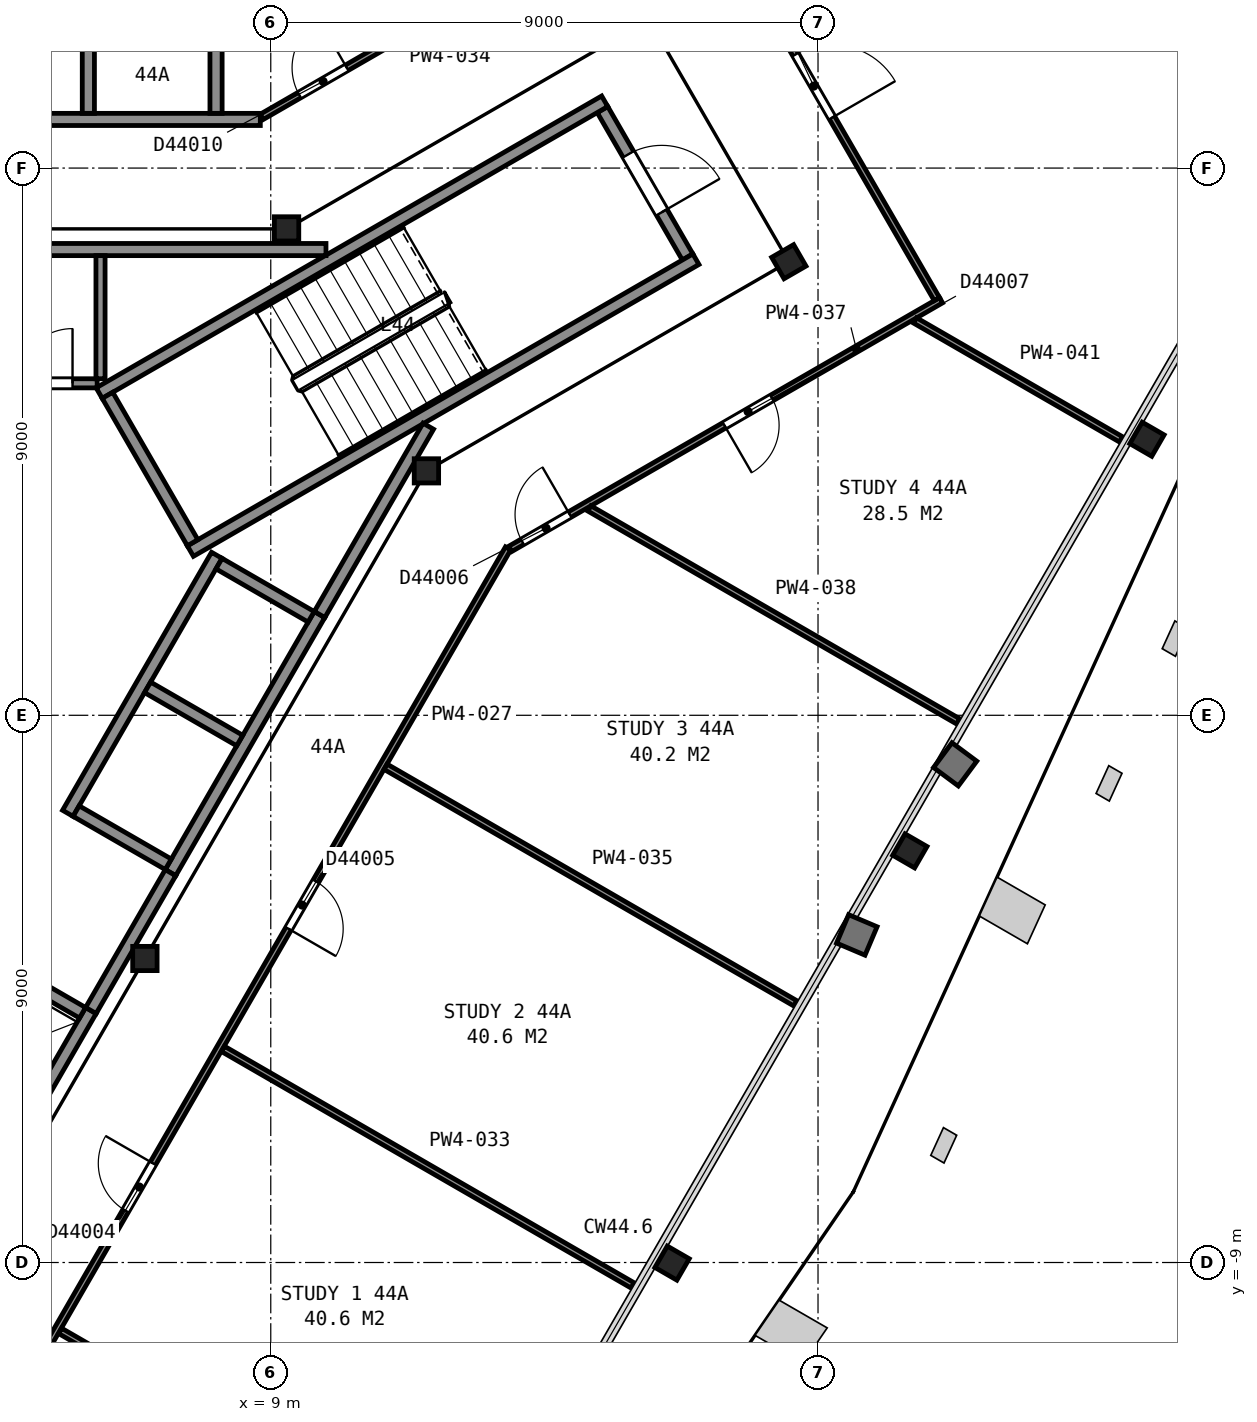
"""IFC4 building model, lengths in metres.
Left out: names, types, materials, properties, quantities, classifications, styles, units other than length and angle.
Written with IfcOpenShell. Run it as: python <this file> out.ifc"""

import sys

from ifc_helpers import new_model, si_unit, direction, frame, frame_2d, origin, origin_2d, place, context, subcontext, project, spatial, rectangle, i_section, extrude, element, fill, save


model = new_model("IFC4")
c1 = context("Model", 3, precision=1e-05, world=origin(), true_north=direction((0.0, 1.0)))
c2 = subcontext(c1, "Body", "Model", "MODEL_VIEW")
j1 = project(units=[si_unit("LENGTHUNIT", "METRE"), si_unit("PLANEANGLEUNIT", "RADIAN")], contexts=[c1])
p1 = place(None, origin())
s1 = spatial("IfcSite", under=j1, at=p1, CompositionType="ELEMENT")
p2 = place(p1, origin())
s2 = spatial("IfcBuilding", under=s1, at=p2, CompositionType="ELEMENT")
p3 = place(p2, frame((0.0, 0.0, 178.4)))
s3 = spatial("IfcBuildingStorey", under=s2, at=p3, CompositionType="ELEMENT", Elevation=178.4)
for number, where, z_axis, x_axis in (
    (1, (15.6, -9.01, 0.035), (0.0, 0.0, 1.0), (-0.5, -0.866, 0.0)),
    (2, (19.51, -2.23, 0.035), (0.0, 0.0, 1.0), (-0.5, -0.866, 0.0)),
):
    element("IfcColumn", number, at=place(p3, frame(where, z_axis=z_axis, x_axis=x_axis)), inside=s3, PredefinedType="COLUMN", context=c2, shape_type="SweptSolid", body=[
        extrude(i_section(OverallWidth=0.406, OverallDepth=0.417, WebThickness=0.03, FlangeThickness=0.048, FilletRadius=0.015, at=origin_2d()), origin(), (0.0, 0.0, 1.0), 3.665),
    ])
p4 = place(p3, frame((23.41, 4.54, 0.04), z_axis=(0.0, 0.0, 1.0), x_axis=(-0.5, -0.866025403784, 0.0)))
e3 = element("IfcColumn", 3, at=p4, inside=s3, PredefinedType="COLUMN", context=c2, shape_type="SweptSolid", body=[
    extrude(i_section(OverallWidth=0.406, OverallDepth=0.417, WebThickness=0.03, FlangeThickness=0.048, FilletRadius=0.015, at=origin_2d()), origin(), (0.0, 0.0, 1.0), 3.66),
])
p5 = place(p3, frame((11.56, 4.02, 0.0), z_axis=(0.0, 0.0, 1.0), x_axis=(1.0, 0.0, 0.0)))
e4 = element("IfcColumn", 4, at=p5, inside=s3, PredefinedType="COLUMN", context=c2, shape_type="SweptSolid", body=[
    extrude(i_section(OverallWidth=0.401, OverallDepth=0.399, WebThickness=0.025, FlangeThickness=0.04, FilletRadius=0.015, at=origin_2d()), origin(), (0.0, 0.0, 1.0), 3.7),
])
p6 = place(p3, frame((17.52, 7.46, 0.0), z_axis=(0.0, 0.0, 1.0), x_axis=(0.5, -0.866025403784, 0.0)))
e5 = element("IfcColumn", 5, at=p6, inside=s3, PredefinedType="COLUMN", context=c2, shape_type="SweptSolid", body=[
    extrude(i_section(OverallWidth=0.406, OverallDepth=0.417, WebThickness=0.03, FlangeThickness=0.048, FilletRadius=0.015, at=origin_2d()), origin(), (0.0, 0.0, 1.0), 3.7),
])
for number, where, z_axis, x_axis in (
    (6, (9.26, 8.0, 0.0), (0.0, 0.0, 1.0), (1.0, 0.0, 0.0)),
    (7, (6.93, -4.0, 0.0), (0.0, 0.0, 1.0), (1.0, 0.0, 0.0)),
):
    element("IfcColumn", number, at=place(p3, frame(where, z_axis=z_axis, x_axis=x_axis)), inside=s3, PredefinedType="COLUMN", context=c2, shape_type="SweptSolid", body=[
        extrude(i_section(OverallWidth=0.401, OverallDepth=0.399, WebThickness=0.025, FlangeThickness=0.04, FilletRadius=0.015, at=origin_2d()), origin(), (0.0, 0.0, 1.0), 3.7),
    ])
p7 = place(p3, frame((15.855, 7.538, 0.0), z_axis=(0.0, 0.0, 1.0), x_axis=(-0.500049511043, 0.865996816683, 0.0)))
e8 = element("IfcWall", 8, at=p7, inside=s3, PredefinedType="PARTITIONING", context=c2, shape_type="SweptSolid", body=[
    extrude(rectangle(XDim=2.8, YDim=0.2, at=frame_2d((1.4, 0.0))), origin(), (0.0, 0.0, 1.0), 3.45),
])
p8 = place(p7, frame((0.85, 0.0, 0.0)))
e9 = element("IfcOpeningElement", 9, at=p8, cuts=e8, PredefinedType="OPENING", context=c2, shape_type="SweptSolid", body=[
    extrude(rectangle(XDim=1.1, YDim=2.1, at=frame_2d((0.55, 1.05))), frame((0.0, 0.11, 0.0), z_axis=(0.0, -1.0, 0.0), x_axis=(1.0, 0.0, 0.0)), (0.0, 0.0, 1.0), 0.22),
])
for number, where, z_axis, x_axis in (
    (10, (6.178, 5.299, 0.0), (0.0, 0.0, 1.0), (0.866, 0.5, 0.0)),
    (11, (7.678, 2.701, 0.0), (0.0, 0.0, 1.0), (0.866, 0.5, 0.0)),
):
    element("IfcWall", number, at=place(p3, frame(where, z_axis=z_axis, x_axis=x_axis)), inside=s3, PredefinedType="PARTITIONING", context=c2, shape_type="SweptSolid", body=[
        extrude(rectangle(XDim=9.6, YDim=0.2, at=frame_2d((4.8, 0.0))), origin(), (0.0, 0.0, 1.0), 3.45),
    ])
p9 = place(p3, frame((7.715, 2.838, 0.0), z_axis=(0.0, 0.0, 1.0), x_axis=(-0.500049511043, 0.865996816683, 0.0)))
e12 = element("IfcWall", 12, at=p9, inside=s3, PredefinedType="PARTITIONING", context=c2, shape_type="SweptSolid", body=[
    extrude(rectangle(XDim=2.8, YDim=0.2, at=frame_2d((1.4, 0.0))), origin(), (0.0, 0.0, 1.0), 3.45),
])
p10 = place(p3, frame((4.766, -7.065, 0.0), z_axis=(0.0, 0.0, 1.0), x_axis=(0.499948979701, 0.866054858364, 0.0)))
e13 = element("IfcWall", 13, at=p10, inside=s3, PredefinedType="PARTITIONING", context=c2, shape_type="SweptSolid", body=[
    extrude(rectangle(XDim=2.55, YDim=0.2, at=frame_2d((1.275, 0.0))), origin(), (0.0, 0.0, 1.0), 3.7),
])
p11 = place(p3, frame((7.351, -2.587, 0.0), z_axis=(0.0, 0.0, 1.0), x_axis=(0.500002801628, 0.866023786258, 0.0)))
e14 = element("IfcWall", 14, at=p11, inside=s3, PredefinedType="PARTITIONING", context=c2, shape_type="SweptSolid", body=[
    extrude(rectangle(XDim=4.9, YDim=0.2, at=frame_2d((2.45, 0.0))), origin(), (0.0, 0.0, 1.0), 3.7),
])
p12 = place(p3, frame((5.663, -1.612, 0.0), z_axis=(0.0, 0.0, 1.0), x_axis=(0.49998122708, 0.866036242063, 0.0)))
e15 = element("IfcWall", 15, at=p12, inside=s3, PredefinedType="PARTITIONING", context=c2, shape_type="SweptSolid", body=[
    extrude(rectangle(XDim=4.9, YDim=0.2, at=frame_2d((2.45, 0.0))), origin(), (0.0, 0.0, 1.0), 3.7),
])
p13 = place(p3, frame((9.665, 1.62, 0.0), z_axis=(0.0, 0.0, 1.0), x_axis=(-0.866002029911, 0.500040482552, 0.0)))
e16 = element("IfcWall", 16, at=p13, inside=s3, PredefinedType="PARTITIONING", context=c2, shape_type="SweptSolid", body=[
    extrude(rectangle(XDim=1.75, YDim=0.2, at=frame_2d((0.875, 0.0))), origin(), (0.0, 0.0, 1.0), 3.7),
])
for number, where, z_axis, x_axis in (
    (17, (8.49, -0.416, 0.0), (0.0, 0.0, 1.0), (-0.866, 0.5, 0.0)),
    (18, (7.315, -2.451, 0.0), (0.0, 0.0, 1.0), (-0.866, 0.5, 0.0)),
):
    element("IfcWall", number, at=place(p3, frame(where, z_axis=z_axis, x_axis=x_axis)), inside=s3, PredefinedType="PARTITIONING", context=c2, shape_type="SweptSolid", body=[
        extrude(rectangle(XDim=1.75, YDim=0.2, at=frame_2d((0.875, 0.0))), origin(), (0.0, 0.0, 1.0), 3.7),
    ])
p14 = place(p3, frame((5.905, -4.893, 0.0), z_axis=(0.0, 0.0, 1.0), x_axis=(-0.866002029911, 0.500040482552, 0.0)))
e19 = element("IfcWall", 19, at=p14, inside=s3, PredefinedType="PARTITIONING", context=c2, shape_type="SweptSolid", body=[
    extrude(rectangle(XDim=1.75, YDim=0.2, at=frame_2d((0.875, 0.0))), origin(), (0.0, 0.0, 1.0), 3.7),
])
p15 = place(p3, frame((-3.933, 7.66, 0.0), z_axis=(0.0, 0.0, 1.0), x_axis=(1.0, 0.0, 0.0)))
e20 = element("IfcWall", 20, at=p15, inside=s3, PredefinedType="PARTITIONING", context=c2, shape_type="SweptSolid", body=[
    extrude(rectangle(XDim=13.841, YDim=0.2, at=frame_2d((6.92, 0.0))), origin(), (0.0, 0.0, 1.0), 3.45),
])
p16 = place(p3, frame((0.925, 5.46, 0.0), z_axis=(0.0, 0.0, 1.0), x_axis=(1.0, 0.0, 0.0)))
e21 = element("IfcWall", 21, at=p16, inside=s3, PredefinedType="PARTITIONING", context=c2, shape_type="SweptSolid", body=[
    extrude(rectangle(XDim=5.22, YDim=0.15, at=frame_2d((2.61, 0.0))), origin(), (0.0, 0.0, 1.0), 3.45),
])
p17 = place(p16, frame((3.915, 0.0, 0.0)))
e22 = element("IfcOpeningElement", 22, at=p17, cuts=e21, PredefinedType="OPENING", context=c2, shape_type="SweptSolid", body=[
    extrude(rectangle(XDim=0.9, YDim=2.1, at=frame_2d((0.45, 1.05))), frame((0.0, 0.085, 0.0), z_axis=(0.0, -1.0, 0.0), x_axis=(1.0, 0.0, 0.0)), (0.0, 0.0, 1.0), 0.17),
])
p18 = place(p3, frame((6.042, -4.855, 0.0), z_axis=(0.0, 0.0, 1.0), x_axis=(0.500252727967, 0.865879442048, 0.0)))
e23 = element("IfcWall", 23, at=p18, inside=s3, PredefinedType="PARTITIONING", context=c2, shape_type="SweptSolid", body=[
    extrude(rectangle(XDim=2.617, YDim=0.2, at=frame_2d((1.309, 0.0))), origin(), (0.0, 0.0, 1.0), 3.45),
])
p19 = place(p3, frame((6.2, 5.535, 0.0), z_axis=(0.0, 0.0, 1.0), x_axis=(0.0, 1.0, 0.0)))
e24 = element("IfcWall", 24, at=p19, inside=s3, PredefinedType="PARTITIONING", context=c2, shape_type="SweptSolid", body=[
    extrude(rectangle(XDim=2.025, YDim=0.15, at=frame_2d((1.013, 0.0))), origin(), (0.0, 0.0, 1.0), 3.45),
])
p20 = place(p3, frame((9.803, 1.658, 0.0), z_axis=(0.0, 0.0, 1.0), x_axis=(0.499943114462, 0.866058244174, 0.0)))
e25 = element("IfcWall", 25, at=p20, inside=s3, PredefinedType="PARTITIONING", context=c2, shape_type="SweptSolid", body=[
    extrude(rectangle(XDim=3.576, YDim=0.2, at=frame_2d((1.788, 0.0))), origin(), (0.0, 0.0, 1.0), 3.45),
])
p21 = place(p3, frame((-8.828, 9.8, 0.0), z_axis=(0.0, 0.0, 1.0), x_axis=(1.0, 0.0, 0.0)))
e26 = element("IfcWall", 26, at=p21, inside=s3, PredefinedType="PARTITIONING", context=c2, shape_type="SweptSolid", body=[
    extrude(rectangle(XDim=17.656, YDim=0.2, at=frame_2d((8.828, 0.0))), origin(), (0.0, 0.0, 1.0), 2.713),
])
p22 = place(p21, frame((11.723, 0.0, 0.0)))
e27 = element("IfcOpeningElement", 27, at=p22, cuts=e26, PredefinedType="OPENING", context=c2, shape_type="SweptSolid", body=[
    extrude(rectangle(XDim=0.9, YDim=2.1, at=frame_2d((0.45, 1.05))), frame((0.0, 0.11, 0.0), z_axis=(0.0, -1.0, 0.0), x_axis=(1.0, 0.0, 0.0)), (0.0, 0.0, 1.0), 0.22),
])
p23 = place(p21, frame((6.367, 0.0, 0.0)))
e28 = element("IfcOpeningElement", 28, at=p23, cuts=e26, PredefinedType="OPENING", context=c2, shape_type="SweptSolid", body=[
    extrude(rectangle(XDim=0.9, YDim=2.1, at=frame_2d((0.45, 1.05))), frame((0.0, 0.11, 0.0), z_axis=(0.0, -1.0, 0.0), x_axis=(1.0, 0.0, 0.0)), (0.0, 0.0, 1.0), 0.22),
])
p24 = place(p3, frame((12.903, 2.745, 0.0), z_axis=(0.0, 0.0, 1.0), x_axis=(-0.499997333799, -0.866026943111, 0.0)))
e29 = element("IfcWall", 29, at=p24, inside=s3, PredefinedType="PARTITIONING", context=c2, shape_type="SweptSolid", body=[
    extrude(rectangle(XDim=17.606, YDim=0.1, at=frame_2d((8.803, 0.0))), origin(), (0.0, 0.0, 1.0), 2.713),
])
p25 = place(p24, frame((15.756, 0.0, 0.0)))
e30 = element("IfcOpeningElement", 30, at=p25, cuts=e29, PredefinedType="OPENING", context=c2, shape_type="SweptSolid", body=[
    extrude(rectangle(XDim=0.9, YDim=2.1, at=frame_2d((0.45, 1.05))), frame((0.0, 0.06, 0.0), z_axis=(0.0, -1.0, 0.0), x_axis=(1.0, 0.0, 0.0)), (0.0, 0.0, 1.0), 0.12),
])
p26 = place(p24, frame((11.679, 0.0, 0.0)))
e31 = element("IfcOpeningElement", 31, at=p26, cuts=e29, PredefinedType="OPENING", context=c2, shape_type="SweptSolid", body=[
    extrude(rectangle(XDim=0.9, YDim=2.1, at=frame_2d((0.45, 1.05))), frame((0.0, 0.06, 0.0), z_axis=(0.0, -1.0, 0.0), x_axis=(1.0, 0.0, 0.0)), (0.0, 0.0, 1.0), 0.12),
])
p27 = place(p24, frame((6.324, 0.0, 0.0)))
e32 = element("IfcOpeningElement", 32, at=p27, cuts=e29, PredefinedType="OPENING", context=c2, shape_type="SweptSolid", body=[
    extrude(rectangle(XDim=0.9, YDim=2.1, at=frame_2d((0.45, 1.05))), frame((0.0, 0.06, 0.0), z_axis=(0.0, -1.0, 0.0), x_axis=(1.0, 0.0, 0.0)), (0.0, 0.0, 1.0), 0.12),
])
p28 = place(p3, frame((5.536, -10.125, 0.0), z_axis=(0.0, 0.0, 1.0), x_axis=(0.866044474677, -0.49996696679, 0.0)))
e33 = element("IfcWall", 33, at=p28, inside=s3, PredefinedType="PARTITIONING", context=c2, shape_type="SweptSolid", body=[
    extrude(rectangle(XDim=7.779, YDim=0.1, at=frame_2d((3.889, 0.0))), origin(), (0.0, 0.0, 1.0), 2.713),
])
p29 = place(p3, frame((6.0, 9.9, 0.0), z_axis=(0.0, 0.0, 1.0), x_axis=(0.0, 1.0, 0.0)))
e34 = element("IfcWall", 34, at=p29, inside=s3, PredefinedType="PARTITIONING", context=c2, shape_type="SweptSolid", body=[
    extrude(rectangle(XDim=7.735, YDim=0.2, at=frame_2d((3.868, 0.0))), origin(), (0.0, 0.0, 1.0), 2.713),
])
p30 = place(p3, frame((8.1, 9.9, 0.0), z_axis=(0.0, 0.0, 1.0), x_axis=(0.0, 1.0, 0.0)))
e35 = element("IfcWall", 35, at=p30, inside=s3, PredefinedType="PARTITIONING", context=c2, shape_type="SweptSolid", body=[
    extrude(rectangle(XDim=2.842, YDim=0.2, at=frame_2d((1.421, 0.0))), origin(), (0.0, 0.0, 1.0), 2.713),
])
p31 = place(p3, frame((8.214, -5.487, 0.0), z_axis=(0.0, 0.0, 1.0), x_axis=(0.866007344409, -0.500031278452, 0.0)))
e36 = element("IfcWall", 36, at=p31, inside=s3, PredefinedType="PARTITIONING", context=c2, shape_type="SweptSolid", body=[
    extrude(rectangle(XDim=7.778, YDim=0.1, at=frame_2d((3.889, 0.0))), origin(), (0.0, 0.0, 1.0), 2.713),
])
p32 = place(p3, frame((8.852, 9.843, 0.0), z_axis=(0.0, 0.0, 1.0), x_axis=(0.866088973199, 0.499889878377, 0.0)))
e37 = element("IfcWall", 37, at=p32, inside=s3, PredefinedType="PARTITIONING", context=c2, shape_type="SweptSolid", body=[
    extrude(rectangle(XDim=8.163, YDim=0.1, at=frame_2d((4.082, 0.0))), origin(), (0.0, 0.0, 1.0), 2.713),
])
p33 = place(p32, frame((4.583, 0.0, 0.0)))
e38 = element("IfcOpeningElement", 38, at=p33, cuts=e37, PredefinedType="OPENING", context=c2, shape_type="SweptSolid", body=[
    extrude(rectangle(XDim=0.9, YDim=2.1, at=frame_2d((0.45, 1.05))), frame((0.0, 0.06, 0.0), z_axis=(0.0, -1.0, 0.0), x_axis=(1.0, 0.0, 0.0)), (0.0, 0.0, 1.0), 0.12),
])
p34 = place(p32, frame((0.715, 0.0, 0.0)))
e39 = element("IfcOpeningElement", 39, at=p34, cuts=e37, PredefinedType="OPENING", context=c2, shape_type="SweptSolid", body=[
    extrude(rectangle(XDim=0.9, YDim=2.1, at=frame_2d((0.45, 1.05))), frame((0.0, 0.06, 0.0), z_axis=(0.0, -1.0, 0.0), x_axis=(1.0, 0.0, 0.0)), (0.0, 0.0, 1.0), 0.12),
])
p35 = place(p3, frame((10.887, -0.846, 0.0), z_axis=(0.0, 0.0, 1.0), x_axis=(0.866004841997, -0.500035612369, 0.0)))
e40 = element("IfcWall", 40, at=p35, inside=s3, PredefinedType="PARTITIONING", context=c2, shape_type="SweptSolid", body=[
    extrude(rectangle(XDim=7.783, YDim=0.1, at=frame_2d((3.892, 0.0))), origin(), (0.0, 0.0, 1.0), 2.713),
])
p36 = place(p3, frame((20.023, 6.826, 0.0), z_axis=(0.0, 0.0, 1.0), x_axis=(-0.866097124975, -0.499875754673, 0.0)))
e41 = element("IfcWall", 41, at=p36, inside=s3, PredefinedType="PARTITIONING", context=c2, shape_type="SweptSolid", body=[
    extrude(rectangle(XDim=8.18, YDim=0.1, at=frame_2d((4.09, 0.0))), origin(), (0.0, 0.0, 1.0), 2.713),
])
p37 = place(p36, frame((7.05, 0.0, 0.0)))
e42 = element("IfcOpeningElement", 42, at=p37, cuts=e41, PredefinedType="OPENING", context=c2, shape_type="SweptSolid", body=[
    extrude(rectangle(XDim=0.9, YDim=2.1, at=frame_2d((0.45, 1.05))), frame((0.0, 0.06, 0.0), z_axis=(0.0, -1.0, 0.0), x_axis=(1.0, 0.0, 0.0)), (0.0, 0.0, 1.0), 0.12),
])
p38 = place(p36, frame((3.214, 0.0, 0.0)))
e43 = element("IfcOpeningElement", 43, at=p38, cuts=e41, PredefinedType="OPENING", context=c2, shape_type="SweptSolid", body=[
    extrude(rectangle(XDim=0.9, YDim=2.1, at=frame_2d((0.45, 1.05))), frame((0.0, 0.06, 0.0), z_axis=(0.0, -1.0, 0.0), x_axis=(1.0, 0.0, 0.0)), (0.0, 0.0, 1.0), 0.12),
])
p39 = place(p3, frame((14.24, 3.402, 0.0), z_axis=(0.0, 0.0, 1.0), x_axis=(0.866018390239, -0.500012147621, 0.0)))
e44 = element("IfcWall", 44, at=p39, inside=s3, PredefinedType="PARTITIONING", context=c2, shape_type="SweptSolid", body=[
    extrude(rectangle(XDim=7.003, YDim=0.1, at=frame_2d((3.501, 0.0))), origin(), (0.0, 0.0, 1.0), 2.713),
])
p40 = place(p3, frame((15.903, 13.855, 0.0), z_axis=(0.0, 0.0, 1.0), x_axis=(0.500415732313, -0.865785247537, 0.0)))
e45 = element("IfcWall", 45, at=p40, inside=s3, PredefinedType="PARTITIONING", context=c2, shape_type="SweptSolid", body=[
    extrude(rectangle(XDim=8.097, YDim=0.1, at=frame_2d((4.049, 0.0))), origin(), (0.0, 0.0, 1.0), 2.713),
])
p41 = place(p40, frame((3.45, 0.0, 0.0)))
e46 = element("IfcOpeningElement", 46, at=p41, cuts=e45, PredefinedType="OPENING", context=c2, shape_type="SweptSolid", body=[
    extrude(rectangle(XDim=1.2, YDim=2.1, at=frame_2d((0.6, 1.05))), frame((0.0, 0.06, 0.0), z_axis=(0.0, -1.0, 0.0), x_axis=(1.0, 0.0, 0.0)), (0.0, 0.0, 1.0), 0.12),
])
p42 = place(p3, frame((19.596, 6.494, 0.0), z_axis=(0.0, 0.0, 1.0), x_axis=(0.865998449813, -0.500046682742, 0.0)))
e47 = element("IfcWall", 47, at=p42, inside=s3, PredefinedType="PARTITIONING", context=c2, shape_type="SweptSolid", body=[
    extrude(rectangle(XDim=3.911, YDim=0.1, at=frame_2d((1.956, 0.0))), origin(), (0.0, 0.0, 1.0), 2.713),
])
p43 = place(p8, origin())
e48 = element("IfcDoor", 48, at=p43, inside=s3, OperationType="SINGLE_SWING_LEFT", PredefinedType="DOOR", context=c2, shape_type="SweptSolid", body=[
    extrude(rectangle(XDim=1.1, YDim=2.1, at=frame_2d((0.55, 1.05))), frame((0.0, 0.025, 0.0), z_axis=(0.0, -1.0, 0.0), x_axis=(1.0, 0.0, 0.0)), (0.0, 0.0, 1.0), 0.05),
])
fill(e9, e48)
p44 = place(p17, origin())
e49 = element("IfcDoor", 49, at=p44, inside=s3, OperationType="SINGLE_SWING_RIGHT", PredefinedType="DOOR", context=c2, shape_type="SweptSolid", body=[
    extrude(rectangle(XDim=0.9, YDim=2.1, at=frame_2d((0.45, 1.05))), frame((0.0, 0.025, 0.0), z_axis=(0.0, -1.0, 0.0), x_axis=(1.0, 0.0, 0.0)), (0.0, 0.0, 1.0), 0.05),
])
fill(e22, e49)
p45 = place(p26, origin())
e50 = element("IfcDoor", 50, at=p45, inside=s3, OperationType="SINGLE_SWING_LEFT", PredefinedType="DOOR", context=c2, shape_type="SweptSolid", body=[
    extrude(rectangle(XDim=0.9, YDim=2.1, at=frame_2d((0.45, 1.05))), frame((0.0, 0.025, 0.0), z_axis=(0.0, -1.0, 0.0), x_axis=(1.0, 0.0, 0.0)), (0.0, 0.0, 1.0), 0.05),
])
fill(e31, e50)
p46 = place(p27, origin())
e51 = element("IfcDoor", 51, at=p46, inside=s3, OperationType="SINGLE_SWING_RIGHT", PredefinedType="DOOR", context=c2, shape_type="SweptSolid", body=[
    extrude(rectangle(XDim=0.9, YDim=2.1, at=frame_2d((0.45, 1.05))), frame((0.0, 0.025, 0.0), z_axis=(0.0, -1.0, 0.0), x_axis=(1.0, 0.0, 0.0)), (0.0, 0.0, 1.0), 0.05),
])
fill(e32, e51)
p47 = place(p34, origin())
e52 = element("IfcDoor", 52, at=p47, inside=s3, OperationType="SINGLE_SWING_RIGHT", PredefinedType="DOOR", context=c2, shape_type="SweptSolid", body=[
    extrude(rectangle(XDim=0.9, YDim=2.1, at=frame_2d((0.45, 1.05))), frame((0.0, 0.025, 0.0), z_axis=(0.0, -1.0, 0.0), x_axis=(1.0, 0.0, 0.0)), (0.0, 0.0, 1.0), 0.05),
])
fill(e39, e52)
p48 = place(p37, origin())
e53 = element("IfcDoor", 53, at=p48, inside=s3, OperationType="SINGLE_SWING_LEFT", PredefinedType="DOOR", context=c2, shape_type="SweptSolid", body=[
    extrude(rectangle(XDim=0.9, YDim=2.1, at=frame_2d((0.45, 1.05))), frame((0.0, 0.025, 0.0), z_axis=(0.0, -1.0, 0.0), x_axis=(1.0, 0.0, 0.0)), (0.0, 0.0, 1.0), 0.05),
])
fill(e42, e53)
p49 = place(p38, origin())
e54 = element("IfcDoor", 54, at=p49, inside=s3, OperationType="SINGLE_SWING_RIGHT", PredefinedType="DOOR", context=c2, shape_type="SweptSolid", body=[
    extrude(rectangle(XDim=0.9, YDim=2.1, at=frame_2d((0.45, 1.05))), frame((0.0, 0.025, 0.0), z_axis=(0.0, -1.0, 0.0), x_axis=(1.0, 0.0, 0.0)), (0.0, 0.0, 1.0), 0.05),
])
fill(e43, e54)
p50 = place(p41, origin())
e55 = element("IfcDoor", 55, at=p50, inside=s3, OperationType="SINGLE_SWING_RIGHT", PredefinedType="DOOR", context=c2, shape_type="SweptSolid", body=[
    extrude(rectangle(XDim=1.2, YDim=2.1, at=frame_2d((0.6, 1.05))), frame((0.0, 0.025, 0.0), z_axis=(0.0, -1.0, 0.0), x_axis=(1.0, 0.0, 0.0)), (0.0, 0.0, 1.0), 0.05),
])
fill(e46, e55)
save(model, sys.argv[1])
